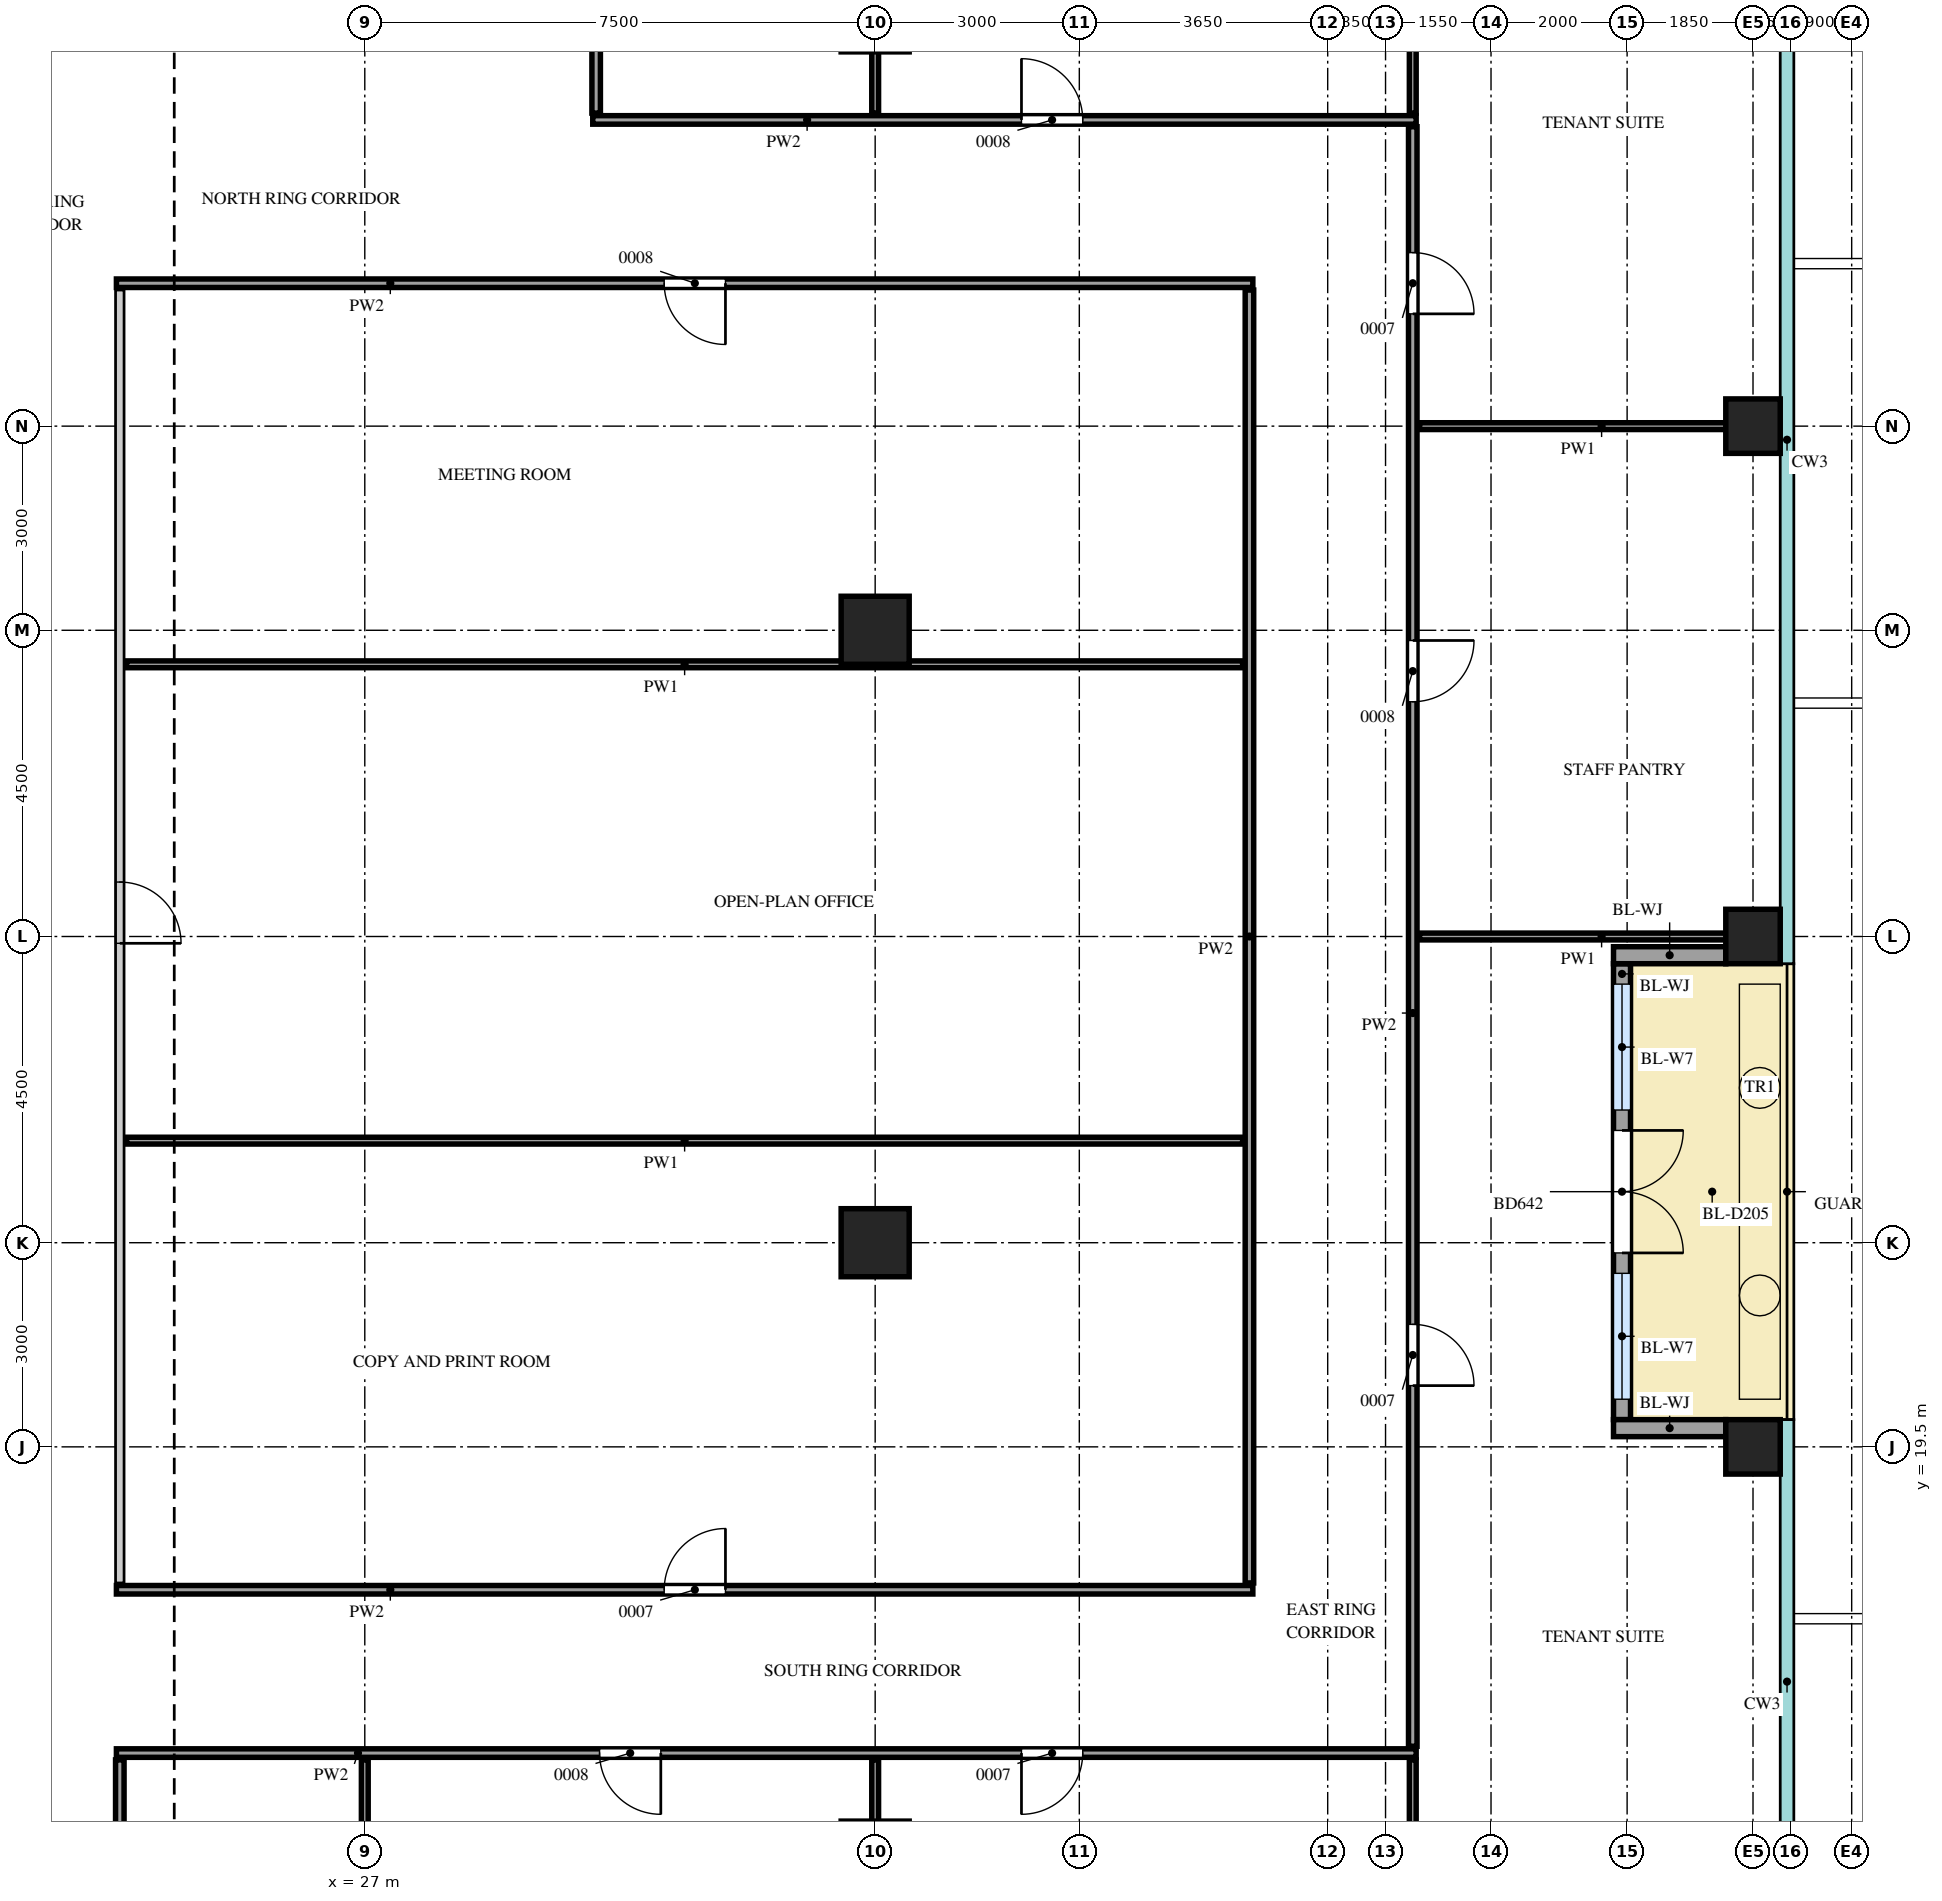
"""IFC4 building model, lengths in metres.
Left out: names, types, materials, properties, quantities, classifications, styles, units other than length and angle.
Written with IfcOpenShell. Run it as: python <this file> out.ifc"""

import sys

from ifc_helpers import new_model, si_unit, direction, frame, frame_2d, origin, origin_2d, place, context, subcontext, project, spatial, rectangle, extrude, source, transform, mapped, element, fill, save


model = new_model("IFC4")
c1 = context("Model", 3, precision=1e-05, world=origin(), true_north=direction((0.0, 1.0)))
c2 = subcontext(c1, "Body", "Model", "MODEL_VIEW")
j1 = project(units=[si_unit("LENGTHUNIT", "METRE"), si_unit("PLANEANGLEUNIT", "RADIAN")], contexts=[c1])
p1 = place(None, origin())
s1 = spatial("IfcSite", under=j1, at=p1, CompositionType="ELEMENT")
p2 = place(p1, origin())
s2 = spatial("IfcBuilding", under=s1, at=p2, CompositionType="ELEMENT")
p3 = place(p2, frame((0.0, 0.0, 286.2)))
s3 = spatial("IfcBuildingStorey", under=s2, at=p3, CompositionType="ELEMENT", Elevation=286.2)
m1 = source(origin(), c2, "Body", "SweptSolid", [
    extrude(rectangle(XDim=0.8, YDim=0.8, at=origin_2d()), origin(), (0.0, 0.0, 1.0), 3.75),
])
for number, where, z_axis, x_axis in (
    (1, (47.4, 19.5, 0.0), (0.0, 0.0, 1.0), (1.0, 0.0, 0.0)),
    (2, (47.4, 27.0, 0.0), (0.0, 0.0, 1.0), (1.0, 0.0, 0.0)),
    (3, (47.4, 34.5, 0.0), (0.0, 0.0, 1.0), (1.0, 0.0, 0.0)),
):
    element("IfcColumn", number, at=place(p3, frame(where, z_axis=z_axis, x_axis=x_axis)), inside=s3, PredefinedType="COLUMN", context=c2, shape_type="MappedRepresentation", body=[
        mapped(m1, transform((0.0, 0.0, 0.0))),
    ])
m2 = source(origin(), c2, "Body", "SweptSolid", [
    extrude(rectangle(XDim=1.0, YDim=1.0, at=origin_2d()), origin(), (0.0, 0.0, 1.0), 3.75),
])
for number, where, z_axis, x_axis in (
    (4, (34.5, 22.5, 0.0), (0.0, 0.0, 1.0), (1.0, 0.0, 0.0)),
    (5, (34.5, 31.5, 0.0), (0.0, 0.0, 1.0), (1.0, 0.0, 0.0)),
):
    element("IfcColumn", number, at=place(p3, frame(where, z_axis=z_axis, x_axis=x_axis)), inside=s3, PredefinedType="COLUMN", context=c2, shape_type="MappedRepresentation", body=[
        mapped(m2, transform((0.0, 0.0, 0.0))),
    ])
m3 = source(origin(), c2, "Body", "SweptSolid", [
    extrude(rectangle(XDim=6.7, YDim=0.25, at=frame_2d((3.35, 0.0))), origin(), (0.0, 0.0, 1.0), 3.2),
])
p4 = place(p3, frame((45.475, 19.9, 0.0), z_axis=(0.0, 0.0, 1.0), x_axis=(0.0, 1.0, 0.0)))
e6 = element("IfcWall", 6, at=p4, inside=s3, PredefinedType="SOLIDWALL", context=c2, shape_type="MappedRepresentation", body=[
    mapped(m3, transform((0.0, 0.0, 0.0))),
])
m4 = source(origin(), c2, "Body", "SweptSolid", [
    extrude(rectangle(XDim=1.85, YDim=2.4, at=frame_2d((0.925, 1.2))), frame((0.0, 0.135, 0.0), z_axis=(0.0, -1.0, 0.0), x_axis=(1.0, 0.0, 0.0)), (0.0, 0.0, 1.0), 0.27),
])
p5 = place(p4, frame((0.3, 0.0, 0.0)))
e7 = element("IfcOpeningElement", 7, at=p5, cuts=e6, PredefinedType="OPENING", context=c2, shape_type="MappedRepresentation", body=[
    mapped(m4, transform((0.0, 0.0, 0.0))),
])
p6 = place(p4, frame((4.55, 0.0, 0.0)))
e8 = element("IfcOpeningElement", 8, at=p6, cuts=e6, PredefinedType="OPENING", context=c2, shape_type="MappedRepresentation", body=[
    mapped(m4, transform((0.0, 0.0, 0.0))),
])
m5 = source(origin(), c2, "Body", "SweptSolid", [
    extrude(rectangle(XDim=1.8, YDim=2.4, at=frame_2d((0.9, 1.2))), frame((0.0, 0.135, 0.0), z_axis=(0.0, -1.0, 0.0), x_axis=(1.0, 0.0, 0.0)), (0.0, 0.0, 1.0), 0.27),
])
p7 = place(p4, frame((2.45, 0.0, 0.0)))
e9 = element("IfcOpeningElement", 9, at=p7, cuts=e6, PredefinedType="OPENING", context=c2, shape_type="MappedRepresentation", body=[
    mapped(m5, transform((0.0, 0.0, 0.0))),
])
m6 = source(origin(), c2, "Body", "SweptSolid", [
    extrude(rectangle(XDim=1.65, YDim=0.25, at=frame_2d((0.825, 0.0))), origin(), (0.0, 0.0, 1.0), 3.2),
])
for number, where, z_axis, x_axis in (
    (10, (47.0, 19.775, 0.0), (0.0, 0.0, 1.0), (-1.0, 0.0, 0.0)),
    (11, (47.0, 26.725, 0.0), (0.0, 0.0, 1.0), (-1.0, 0.0, 0.0)),
):
    element("IfcWall", number, at=place(p3, frame(where, z_axis=z_axis, x_axis=x_axis)), inside=s3, PredefinedType="SOLIDWALL", context=c2, shape_type="MappedRepresentation", body=[
        mapped(m6, transform((0.0, 0.0, 0.0))),
    ])
m7 = source(origin(), c2, "Body", "SweptSolid", [
    extrude(rectangle(XDim=8.75, YDim=0.125, at=frame_2d((4.375, 0.0))), origin(), (0.0, 0.0, 1.0), 3.8),
])
p8 = place(p3, frame((23.4, 6.15, 0.0), z_axis=(0.0, 0.0, 1.0), x_axis=(0.0, 1.0, 0.0)))
e12 = element("IfcWall", 12, at=p8, inside=s3, PredefinedType="PARTITIONING", context=c2, shape_type="MappedRepresentation", body=[
    mapped(m7, transform((0.0, 0.0, 0.0))),
])
m8 = source(origin(), c2, "Body", "SweptSolid", [
    extrude(rectangle(XDim=0.9, YDim=2.1, at=frame_2d((0.45, 1.05))), frame((0.0, 0.073, 0.0), z_axis=(0.0, -1.0, 0.0), x_axis=(1.0, 0.0, 0.0)), (0.0, 0.0, 1.0), 0.145),
])
p9 = place(p8, frame((2.25, 0.0, 0.0)))
e13 = element("IfcOpeningElement", 13, at=p9, cuts=e12, PredefinedType="OPENING", context=c2, shape_type="MappedRepresentation", body=[
    mapped(m8, transform((0.0, 0.0, 0.0))),
])
m9 = source(origin(), c2, "Body", "SweptSolid", [
    extrude(rectangle(XDim=8.75, YDim=0.1, at=frame_2d((4.375, 0.0))), origin(), (0.0, 0.0, 1.0), 3.35),
])
for number, where, z_axis, x_axis in (
    (14, (27.0, 6.15, 0.0), (0.0, 0.0, 1.0), (0.0, 1.0, 0.0)),
    (15, (34.5, 6.15, 0.0), (0.0, 0.0, 1.0), (0.0, 1.0, 0.0)),
):
    element("IfcWall", number, at=place(p3, frame(where, z_axis=z_axis, x_axis=x_axis)), inside=s3, PredefinedType="PARTITIONING", context=c2, shape_type="MappedRepresentation", body=[
        mapped(m9, transform((0.0, 0.0, 0.0))),
    ])
m10 = source(origin(), c2, "Body", "SweptSolid", [
    extrude(rectangle(XDim=2.75, YDim=0.1, at=frame_2d((1.375, 0.0))), origin(), (0.0, 0.0, 1.0), 3.8),
])
p10 = place(p3, frame((42.4, 12.15, 0.0), z_axis=(0.0, 0.0, 1.0), x_axis=(0.0, 1.0, 0.0)))
e16 = element("IfcWall", 16, at=p10, inside=s3, PredefinedType="PARTITIONING", context=c2, shape_type="MappedRepresentation", body=[
    mapped(m10, transform((0.0, 0.0, 0.0))),
])
m11 = source(origin(), c2, "Body", "SweptSolid", [
    extrude(rectangle(XDim=19.1, YDim=0.125, at=frame_2d((9.55, 0.0))), origin(), (0.0, 0.0, 1.0), 3.8),
])
p11 = place(p3, frame((23.35, 15.0, 0.0), z_axis=(0.0, 0.0, 1.0), x_axis=(1.0, 0.0, 0.0)))
e17 = element("IfcWall", 17, at=p11, inside=s3, PredefinedType="PARTITIONING", context=c2, shape_type="MappedRepresentation", body=[
    mapped(m11, transform((0.0, 0.0, 0.0))),
])
p12 = place(p11, frame((7.1, 0.0, 0.0)))
e18 = element("IfcOpeningElement", 18, at=p12, cuts=e17, PredefinedType="OPENING", context=c2, shape_type="MappedRepresentation", body=[
    mapped(m8, transform((0.0, 0.0, 0.0))),
])
p13 = place(p11, frame((13.3, 0.0, 0.0)))
e19 = element("IfcOpeningElement", 19, at=p13, cuts=e17, PredefinedType="OPENING", context=c2, shape_type="MappedRepresentation", body=[
    mapped(m8, transform((0.0, 0.0, 0.0))),
])
m12 = source(origin(), c2, "Body", "SweptSolid", [
    extrude(rectangle(XDim=23.8, YDim=0.125, at=frame_2d((11.9, 0.0))), origin(), (0.0, 0.0, 1.0), 3.8),
])
p14 = place(p3, frame((42.4, 15.1, 0.0), z_axis=(0.0, 0.0, 1.0), x_axis=(0.0, 1.0, 0.0)))
e20 = element("IfcWall", 20, at=p14, inside=s3, PredefinedType="PARTITIONING", context=c2, shape_type="MappedRepresentation", body=[
    mapped(m12, transform((0.0, 0.0, 0.0))),
])
p15 = place(p14, frame((5.3, 0.0, 0.0)))
e21 = element("IfcOpeningElement", 21, at=p15, cuts=e20, PredefinedType="OPENING", context=c2, shape_type="MappedRepresentation", body=[
    mapped(m8, transform((0.0, 0.0, 0.0))),
])
p16 = place(p14, frame((15.35, 0.0, 0.0)))
e22 = element("IfcOpeningElement", 22, at=p16, cuts=e20, PredefinedType="OPENING", context=c2, shape_type="MappedRepresentation", body=[
    mapped(m8, transform((0.0, 0.0, 0.0))),
])
p17 = place(p14, frame((21.05, 0.0, 0.0)))
e23 = element("IfcOpeningElement", 23, at=p17, cuts=e20, PredefinedType="OPENING", context=c2, shape_type="MappedRepresentation", body=[
    mapped(m8, transform((0.0, 0.0, 0.0))),
])
m13 = source(origin(), c2, "Body", "SweptSolid", [
    extrude(rectangle(XDim=16.7, YDim=0.125, at=frame_2d((8.35, 0.0))), origin(), (0.0, 0.0, 1.0), 3.8),
])
p18 = place(p3, frame((23.35, 17.4, 0.0), z_axis=(0.0, 0.0, 1.0), x_axis=(1.0, 0.0, 0.0)))
e24 = element("IfcWall", 24, at=p18, inside=s3, PredefinedType="PARTITIONING", context=c2, shape_type="MappedRepresentation", body=[
    mapped(m13, transform((0.0, 0.0, 0.0))),
])
p19 = place(p18, frame((8.05, 0.0, 0.0)))
e25 = element("IfcOpeningElement", 25, at=p19, cuts=e24, PredefinedType="OPENING", context=c2, shape_type="MappedRepresentation", body=[
    mapped(m8, transform((0.0, 0.0, 0.0))),
])
m14 = source(origin(), c2, "Body", "SweptSolid", [
    extrude(rectangle(XDim=19.0, YDim=0.125, at=frame_2d((9.5, 0.0))), origin(), (0.0, 0.0, 1.0), 3.8),
])
p20 = place(p3, frame((23.4, 17.5, 0.0), z_axis=(0.0, 0.0, 1.0), x_axis=(0.0, 1.0, 0.0)))
e26 = element("IfcWall", 26, at=p20, inside=s3, PredefinedType="PARTITIONING", context=c2, shape_type="MappedRepresentation", body=[
    mapped(m14, transform((0.0, 0.0, 0.0))),
])
p21 = place(p20, frame((9.4, 0.0, 0.0)))
e27 = element("IfcOpeningElement", 27, at=p21, cuts=e26, PredefinedType="OPENING", context=c2, shape_type="MappedRepresentation", body=[
    mapped(m8, transform((0.0, 0.0, 0.0))),
])
p22 = place(p3, frame((40.0, 17.5, 0.0), z_axis=(0.0, 0.0, 1.0), x_axis=(0.0, 1.0, 0.0)))
e28 = element("IfcWall", 28, at=p22, inside=s3, PredefinedType="PARTITIONING", context=c2, shape_type="MappedRepresentation", body=[
    mapped(m14, transform((0.0, 0.0, 0.0))),
])
m15 = source(origin(), c2, "Body", "SweptSolid", [
    extrude(rectangle(XDim=16.4, YDim=0.1, at=frame_2d((8.2, 0.0))), origin(), (0.0, 0.0, 1.0), 3.8),
])
p23 = place(p3, frame((23.5, 24.0, 0.0), z_axis=(0.0, 0.0, 1.0), x_axis=(1.0, 0.0, 0.0)))
e29 = element("IfcWall", 29, at=p23, inside=s3, PredefinedType="PARTITIONING", context=c2, shape_type="MappedRepresentation", body=[
    mapped(m15, transform((0.0, 0.0, 0.0))),
])
m16 = source(origin(), c2, "Body", "SweptSolid", [
    extrude(rectangle(XDim=5.35, YDim=0.1, at=frame_2d((2.675, 0.0))), origin(), (0.0, 0.0, 1.0), 3.8),
])
p24 = place(p3, frame((42.5, 27.0, 0.0), z_axis=(0.0, 0.0, 1.0), x_axis=(1.0, 0.0, 0.0)))
e30 = element("IfcWall", 30, at=p24, inside=s3, PredefinedType="PARTITIONING", context=c2, shape_type="MappedRepresentation", body=[
    mapped(m16, transform((0.0, 0.0, 0.0))),
])
p25 = place(p3, frame((23.5, 31.0, 0.0), z_axis=(0.0, 0.0, 1.0), x_axis=(1.0, 0.0, 0.0)))
e31 = element("IfcWall", 31, at=p25, inside=s3, PredefinedType="PARTITIONING", context=c2, shape_type="MappedRepresentation", body=[
    mapped(m15, transform((0.0, 0.0, 0.0))),
])
p26 = place(p3, frame((42.5, 34.5, 0.0), z_axis=(0.0, 0.0, 1.0), x_axis=(1.0, 0.0, 0.0)))
e32 = element("IfcWall", 32, at=p26, inside=s3, PredefinedType="PARTITIONING", context=c2, shape_type="MappedRepresentation", body=[
    mapped(m16, transform((0.0, 0.0, 0.0))),
])
p27 = place(p3, frame((23.35, 36.6, 0.0), z_axis=(0.0, 0.0, 1.0), x_axis=(1.0, 0.0, 0.0)))
e33 = element("IfcWall", 33, at=p27, inside=s3, PredefinedType="PARTITIONING", context=c2, shape_type="MappedRepresentation", body=[
    mapped(m13, transform((0.0, 0.0, 0.0))),
])
p28 = place(p27, frame((8.05, 0.0, 0.0)))
e34 = element("IfcOpeningElement", 34, at=p28, cuts=e33, PredefinedType="OPENING", context=c2, shape_type="MappedRepresentation", body=[
    mapped(m8, transform((0.0, 0.0, 0.0))),
])
m17 = source(origin(), c2, "Body", "SweptSolid", [
    extrude(rectangle(XDim=12.1, YDim=0.125, at=frame_2d((6.05, 0.0))), origin(), (0.0, 0.0, 1.0), 3.8),
])
p29 = place(p3, frame((30.35, 39.0, 0.0), z_axis=(0.0, 0.0, 1.0), x_axis=(1.0, 0.0, 0.0)))
e35 = element("IfcWall", 35, at=p29, inside=s3, PredefinedType="PARTITIONING", context=c2, shape_type="MappedRepresentation", body=[
    mapped(m17, transform((0.0, 0.0, 0.0))),
])
p30 = place(p29, frame((6.3, 0.0, 0.0)))
e36 = element("IfcOpeningElement", 36, at=p30, cuts=e35, PredefinedType="OPENING", context=c2, shape_type="MappedRepresentation", body=[
    mapped(m8, transform((0.0, 0.0, 0.0))),
])
p31 = place(p3, frame((30.4, 39.1, 0.0), z_axis=(0.0, 0.0, 1.0), x_axis=(0.0, 1.0, 0.0)))
e37 = element("IfcWall", 37, at=p31, inside=s3, PredefinedType="PARTITIONING", context=c2, shape_type="MappedRepresentation", body=[
    mapped(m7, transform((0.0, 0.0, 0.0))),
])
p32 = place(p31, frame((2.9, 0.0, 0.0)))
e38 = element("IfcOpeningElement", 38, at=p32, cuts=e37, PredefinedType="OPENING", context=c2, shape_type="MappedRepresentation", body=[
    mapped(m8, transform((0.0, 0.0, 0.0))),
])
p33 = place(p3, frame((34.5, 39.1, 0.0), z_axis=(0.0, 0.0, 1.0), x_axis=(0.0, 1.0, 0.0)))
e39 = element("IfcWall", 39, at=p33, inside=s3, PredefinedType="PARTITIONING", context=c2, shape_type="MappedRepresentation", body=[
    mapped(m9, transform((0.0, 0.0, 0.0))),
])
p34 = place(p3, frame((42.4, 39.1, 0.0), z_axis=(0.0, 0.0, 1.0), x_axis=(0.0, 1.0, 0.0)))
e40 = element("IfcWall", 40, at=p34, inside=s3, PredefinedType="PARTITIONING", context=c2, shape_type="MappedRepresentation", body=[
    mapped(m10, transform((0.0, 0.0, 0.0))),
])
m18 = source(origin(), c2, "Body", "SweptSolid", [
    extrude(rectangle(XDim=1.85, YDim=2.4, at=frame_2d((0.925, 1.2))), frame((0.0, 0.03, 0.0), z_axis=(0.0, -1.0, 0.0), x_axis=(1.0, 0.0, 0.0)), (0.0, 0.0, 1.0), 0.06),
])
p35 = place(p5, origin())
e41 = element("IfcWindow", 41, at=p35, inside=s3, PartitioningType="SINGLE_PANEL", PredefinedType="WINDOW", context=c2, shape_type="MappedRepresentation", body=[
    mapped(m18, transform((0.0, 0.0, 0.0))),
])
fill(e7, e41)
p36 = place(p6, origin())
e42 = element("IfcWindow", 42, at=p36, inside=s3, PartitioningType="SINGLE_PANEL", PredefinedType="WINDOW", context=c2, shape_type="MappedRepresentation", body=[
    mapped(m18, transform((0.0, 0.0, 0.0))),
])
fill(e8, e42)
m19 = source(origin(), c2, "Body", "SweptSolid", [
    extrude(rectangle(XDim=1.8, YDim=2.4, at=frame_2d((0.9, 1.2))), frame((0.0, 0.025, 0.0), z_axis=(0.0, -1.0, 0.0), x_axis=(1.0, 0.0, 0.0)), (0.0, 0.0, 1.0), 0.05),
])
p37 = place(p7, origin())
e43 = element("IfcDoor", 43, at=p37, inside=s3, OperationType="DOUBLE_DOOR_DOUBLE_SWING", PredefinedType="DOOR", context=c2, shape_type="MappedRepresentation", body=[
    mapped(m19, transform((0.0, 0.0, 0.0))),
])
fill(e9, e43)
m20 = source(origin(), c2, "Body", "SweptSolid", [
    extrude(rectangle(XDim=0.9, YDim=2.1, at=frame_2d((0.45, 1.05))), frame((0.0, 0.025, 0.0), z_axis=(0.0, -1.0, 0.0), x_axis=(1.0, 0.0, 0.0)), (0.0, 0.0, 1.0), 0.05),
])
p38 = place(p12, origin())
e44 = element("IfcDoor", 44, at=p38, inside=s3, OperationType="SINGLE_SWING_RIGHT", PredefinedType="DOOR", context=c2, shape_type="MappedRepresentation", body=[
    mapped(m20, transform((0.0, 0.0, 0.0))),
])
fill(e18, e44)
p39 = place(p13, origin())
e45 = element("IfcDoor", 45, at=p39, inside=s3, OperationType="SINGLE_SWING_LEFT", PredefinedType="DOOR", context=c2, shape_type="MappedRepresentation", body=[
    mapped(m20, transform((0.0, 0.0, 0.0))),
])
fill(e19, e45)
p40 = place(p15, origin())
e46 = element("IfcDoor", 46, at=p40, inside=s3, OperationType="SINGLE_SWING_LEFT", PredefinedType="DOOR", context=c2, shape_type="MappedRepresentation", body=[
    mapped(m20, transform((0.0, 0.0, 0.0))),
])
fill(e21, e46)
p41 = place(p16, origin())
e47 = element("IfcDoor", 47, at=p41, inside=s3, OperationType="SINGLE_SWING_RIGHT", PredefinedType="DOOR", context=c2, shape_type="MappedRepresentation", body=[
    mapped(m20, transform((0.0, 0.0, 0.0))),
])
fill(e22, e47)
p42 = place(p17, origin())
e48 = element("IfcDoor", 48, at=p42, inside=s3, OperationType="SINGLE_SWING_LEFT", PredefinedType="DOOR", context=c2, shape_type="MappedRepresentation", body=[
    mapped(m20, transform((0.0, 0.0, 0.0))),
])
fill(e23, e48)
p43 = place(p30, origin())
e49 = element("IfcDoor", 49, at=p43, inside=s3, OperationType="SINGLE_SWING_RIGHT", PredefinedType="DOOR", context=c2, shape_type="MappedRepresentation", body=[
    mapped(m20, transform((0.0, 0.0, 0.0))),
])
fill(e36, e49)
p44 = place(p19, origin())
e50 = element("IfcDoor", 50, at=p44, inside=s3, OperationType="SINGLE_SWING_LEFT", PredefinedType="DOOR", context=c2, shape_type="MappedRepresentation", body=[
    mapped(m20, transform((0.0, 0.0, 0.0))),
])
fill(e25, e50)
p45 = place(p21, origin())
e51 = element("IfcDoor", 51, at=p45, inside=s3, OperationType="SINGLE_SWING_LEFT", PredefinedType="DOOR", context=c2, shape_type="MappedRepresentation", body=[
    mapped(m20, transform((0.0, 0.0, 0.0))),
])
fill(e27, e51)
p46 = place(p28, origin())
e52 = element("IfcDoor", 52, at=p46, inside=s3, OperationType="SINGLE_SWING_RIGHT", PredefinedType="DOOR", context=c2, shape_type="MappedRepresentation", body=[
    mapped(m20, transform((0.0, 0.0, 0.0))),
])
fill(e34, e52)
save(model, sys.argv[1])
